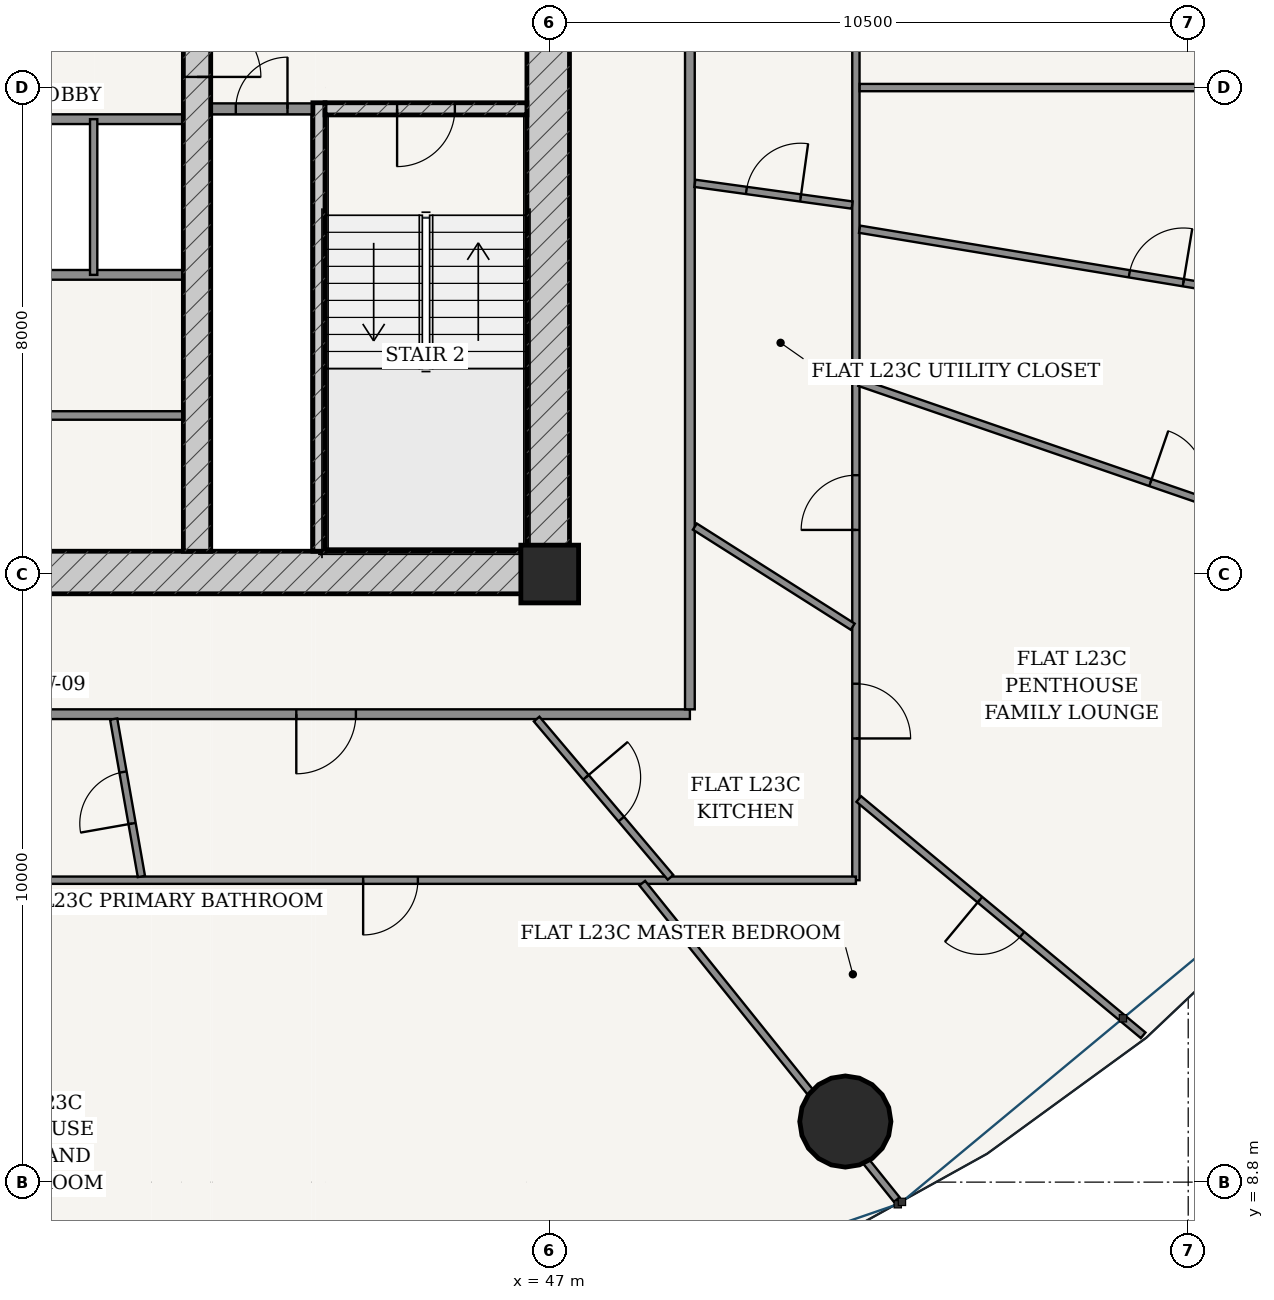
"""IFC4 building model, lengths in metres.
Left out: names, types, materials, properties, quantities, classifications, styles, units other than length and angle.
Written with IfcOpenShell. Run it as: python <this file> out.ifc"""

import sys

from ifc_helpers import new_model, si_unit, direction, frame, frame_2d, origin, origin_2d, place, context, subcontext, project, spatial, rectangle, hollow_circle, extrude, source, transform, mapped, element, fill, save


model = new_model("IFC4")
c1 = context("Model", 3, precision=1e-05, world=origin(), true_north=direction((-0.2419218956, 0.970295726276)))
c2 = subcontext(c1, "Body", "Model", "MODEL_VIEW")
j1 = project(units=[si_unit("LENGTHUNIT", "METRE"), si_unit("PLANEANGLEUNIT", "RADIAN")], contexts=[c1])
p1 = place(None, origin())
s1 = spatial("IfcSite", under=j1, at=p1, CompositionType="ELEMENT")
p2 = place(p1, origin())
s2 = spatial("IfcBuilding", under=s1, at=p2, CompositionType="ELEMENT")
p3 = place(p2, frame((0.0, 0.0, 90.6)))
s3 = spatial("IfcBuildingStorey", under=s2, at=p3, CompositionType="ELEMENT", Elevation=90.6)
p4 = place(p3, frame((47.0, 18.8, 0.0), z_axis=(0.0, 0.0, 1.0), x_axis=(1.0, 0.0, 0.0)))
e1 = element("IfcColumn", 1, at=p4, inside=s3, PredefinedType="COLUMN", context=c2, shape_type="SweptSolid", body=[
    extrude(rectangle(XDim=0.95, YDim=0.95, at=origin_2d()), origin(), (0.0, 0.0, 1.0), 3.6),
])
p5 = place(p3, frame((28.675, 18.825, 0.0), z_axis=(0.0, 0.0, 1.0), x_axis=(1.0, 0.0, 0.0)))
e2 = element("IfcWall", 2, at=p5, inside=s3, PredefinedType="SHEAR", context=c2, shape_type="SweptSolid", body=[
    extrude(rectangle(XDim=18.65, YDim=0.7, at=frame_2d((9.325, 0.0))), origin(), (0.0, 0.0, 1.0), 3.325),
])
p6 = place(p5, frame((8.9, 0.0, 0.0)))
e3 = element("IfcOpeningElement", 3, at=p6, cuts=e2, PredefinedType="OPENING", context=c2, shape_type="SweptSolid", body=[
    extrude(rectangle(XDim=0.85, YDim=2.1, at=frame_2d((0.425, 1.05))), frame((0.0, 0.36, 0.0), z_axis=(0.0, -1.0, 0.0), x_axis=(1.0, 0.0, 0.0)), (0.0, 0.0, 1.0), 0.72),
])
p7 = place(p3, frame((46.975, 19.175, 0.0), z_axis=(0.0, 0.0, 1.0), x_axis=(0.0, 1.0, 0.0)))
e4 = element("IfcWall", 4, at=p7, inside=s3, PredefinedType="SHEAR", context=c2, shape_type="SweptSolid", body=[
    extrude(rectangle(XDim=15.25, YDim=0.7, at=frame_2d((7.625, 0.0))), origin(), (0.0, 0.0, 1.0), 3.325),
])
p8 = place(p7, frame((9.875, 0.0, 0.0)))
e5 = element("IfcOpeningElement", 5, at=p8, cuts=e4, PredefinedType="OPENING", context=c2, shape_type="SweptSolid", body=[
    extrude(rectangle(XDim=1.5, YDim=2.2, at=frame_2d((0.75, 1.1))), frame((0.0, 0.36, 0.0), z_axis=(0.0, -1.0, 0.0), x_axis=(1.0, 0.0, 0.0)), (0.0, 0.0, 1.0), 0.72),
])
p9 = place(p3, frame((43.205, 19.175, 0.0), z_axis=(0.0, 0.0, 1.0), x_axis=(0.0, 1.0, 0.0)))
e6 = element("IfcWall", 6, at=p9, inside=s3, PredefinedType="SOLIDWALL", context=c2, shape_type="SweptSolid", body=[
    extrude(rectangle(XDim=7.375, YDim=0.2, at=frame_2d((3.688, 0.0))), origin(), (0.0, 0.0, 1.0), 3.325),
])
p10 = place(p3, frame((43.305, 26.45, 0.0), z_axis=(0.0, 0.0, 1.0), x_axis=(1.0, 0.0, 0.0)))
e7 = element("IfcWall", 7, at=p10, inside=s3, PredefinedType="SOLIDWALL", context=c2, shape_type="SweptSolid", body=[
    extrude(rectangle(XDim=3.32, YDim=0.2, at=frame_2d((1.66, 0.0))), origin(), (0.0, 0.0, 1.0), 3.325),
])
p11 = place(p10, frame((1.185, 0.0, 0.0)))
e8 = element("IfcOpeningElement", 8, at=p11, cuts=e7, PredefinedType="OPENING", context=c2, shape_type="SweptSolid", body=[
    extrude(rectangle(XDim=0.95, YDim=2.15, at=frame_2d((0.475, 1.075))), frame((0.0, 0.11, 0.0), z_axis=(0.0, -1.0, 0.0), x_axis=(1.0, 0.0, 0.0)), (0.0, 0.0, 1.0), 0.22),
])
p12 = place(p3, frame((41.2, 19.175, 0.0), z_axis=(0.0, 0.0, 1.0), x_axis=(0.0, 1.0, 0.0)))
e9 = element("IfcWall", 9, at=p12, inside=s3, PredefinedType="SHEAR", context=c2, shape_type="SweptSolid", body=[
    extrude(rectangle(XDim=15.25, YDim=0.45, at=frame_2d((7.625, 0.0))), origin(), (0.0, 0.0, 1.0), 3.325),
])
p13 = place(p12, frame((7.8, 0.0, 0.0)))
e10 = element("IfcOpeningElement", 10, at=p13, cuts=e9, PredefinedType="OPENING", context=c2, shape_type="SweptSolid", body=[
    extrude(rectangle(XDim=1.05, YDim=2.15, at=frame_2d((0.525, 1.075))), frame((0.0, 0.235, 0.0), z_axis=(0.0, -1.0, 0.0), x_axis=(1.0, 0.0, 0.0)), (0.0, 0.0, 1.0), 0.47),
])
p14 = place(p3, frame((51.862, 9.796, 0.0), z_axis=(0.0, 0.0, 1.0), x_axis=(1.0, 0.0, 0.0)))
e11 = element("IfcColumn", 11, at=p14, inside=s3, PredefinedType="COLUMN", context=c2, shape_type="SweptSolid", body=[
    extrude(hollow_circle(Radius=0.75, WallThickness=0.045, at=origin_2d()), origin(), (0.0, 0.0, 1.0), 3.6),
])
p15 = place(p3, frame((41.425, 26.45, 0.0), z_axis=(0.0, 0.0, 1.0), x_axis=(1.0, 0.0, 0.0)))
e12 = element("IfcWall", 12, at=p15, inside=s3, PredefinedType="PARTITIONING", context=c2, shape_type="SweptSolid", body=[
    extrude(rectangle(XDim=1.675, YDim=0.18, at=frame_2d((0.837, 0.0))), origin(), (0.0, 0.0, 1.0), 3.325),
])
p16 = place(p15, frame((0.413, 0.0, 0.0)))
e13 = element("IfcOpeningElement", 13, at=p16, cuts=e12, PredefinedType="OPENING", context=c2, shape_type="SweptSolid", body=[
    extrude(rectangle(XDim=0.85, YDim=2.1, at=frame_2d((0.425, 1.05))), frame((0.0, 0.1, 0.0), z_axis=(0.0, -1.0, 0.0), x_axis=(1.0, 0.0, 0.0)), (0.0, 0.0, 1.0), 0.2),
])
for number, where, z_axis, x_axis in (
    (14, (35.025, 26.28, 0.0), (0.0, 0.0, 1.0), (1.0, 0.0, 0.0)),
    (15, (35.025, 23.72, 0.0), (0.0, 0.0, 1.0), (1.0, 0.0, 0.0)),
):
    element("IfcWall", number, at=place(p3, frame(where, z_axis=z_axis, x_axis=x_axis)), inside=s3, PredefinedType="PARTITIONING", context=c2, shape_type="SweptSolid", body=[
        extrude(rectangle(XDim=5.95, YDim=0.16, at=frame_2d((2.975, 0.0))), origin(), (0.0, 0.0, 1.0), 3.325),
    ])
p17 = place(p3, frame((39.5, 23.72, 0.0), z_axis=(0.0, 0.0, 1.0), x_axis=(0.0, 1.0, 0.0)))
e16 = element("IfcWall", 16, at=p17, inside=s3, PredefinedType="PARTITIONING", context=c2, shape_type="SweptSolid", body=[
    extrude(rectangle(XDim=2.56, YDim=0.12, at=frame_2d((1.28, 0.0))), origin(), (0.0, 0.0, 1.0), 3.325),
])
p18 = place(p3, frame((35.025, 21.407, 0.0), z_axis=(0.0, 0.0, 1.0), x_axis=(1.0, 0.0, 0.0)))
e17 = element("IfcWall", 17, at=p18, inside=s3, PredefinedType="PARTITIONING", context=c2, shape_type="SweptSolid", body=[
    extrude(rectangle(XDim=5.95, YDim=0.14, at=frame_2d((2.975, 0.0))), origin(), (0.0, 0.0, 1.0), 3.325),
])
p19 = place(p18, frame((2.55, 0.0, 0.0)))
e18 = element("IfcOpeningElement", 18, at=p19, cuts=e17, PredefinedType="OPENING", context=c2, shape_type="SweptSolid", body=[
    extrude(rectangle(XDim=0.85, YDim=2.1, at=frame_2d((0.425, 1.05))), frame((0.0, 0.08, 0.0), z_axis=(0.0, -1.0, 0.0), x_axis=(1.0, 0.0, 0.0)), (0.0, 0.0, 1.0), 0.16),
])
p20 = place(p3, frame((26.695, 16.495, 0.0), z_axis=(0.0, 0.0, 1.0), x_axis=(1.0, 0.0, 0.0)))
e19 = element("IfcWall", 19, at=p20, inside=s3, PredefinedType="PARTITIONING", context=c2, shape_type="SweptSolid", body=[
    extrude(rectangle(XDim=22.61, YDim=0.16, at=frame_2d((11.305, 0.0))), origin(), (0.0, 0.0, 1.0), 2.767),
])
p21 = place(p20, frame((1.688, 0.0, 0.0)))
e20 = element("IfcOpeningElement", 20, at=p21, cuts=e19, PredefinedType="OPENING", context=c2, shape_type="SweptSolid", body=[
    extrude(rectangle(XDim=0.98, YDim=2.2, at=frame_2d((0.49, 1.1))), frame((0.0, 0.09, 0.0), z_axis=(0.0, -1.0, 0.0), x_axis=(1.0, 0.0, 0.0)), (0.0, 0.0, 1.0), 0.18),
])
p22 = place(p20, frame((16.137, 0.0, 0.0)))
e21 = element("IfcOpeningElement", 21, at=p22, cuts=e19, PredefinedType="OPENING", context=c2, shape_type="SweptSolid", body=[
    extrude(rectangle(XDim=0.98, YDim=2.2, at=frame_2d((0.49, 1.1))), frame((0.0, 0.09, 0.0), z_axis=(0.0, -1.0, 0.0), x_axis=(1.0, 0.0, 0.0)), (0.0, 0.0, 1.0), 0.18),
])
p23 = place(p3, frame((49.305, 16.575, 0.0), z_axis=(0.0, 0.0, 1.0), x_axis=(0.0, 1.0, 0.0)))
e22 = element("IfcWall", 22, at=p23, inside=s3, PredefinedType="PARTITIONING", context=c2, shape_type="SweptSolid", body=[
    extrude(rectangle(XDim=20.45, YDim=0.16, at=frame_2d((10.225, 0.0))), origin(), (0.0, 0.0, 1.0), 2.767),
])
p24 = place(p3, frame((52.035, 34.49, 0.0), z_axis=(0.0, 0.0, 1.0), x_axis=(0.0, -1.0, 0.0)))
e23 = element("IfcWall", 23, at=p24, inside=s3, PredefinedType="PARTITIONING", context=c2, shape_type="SweptSolid", body=[
    extrude(rectangle(XDim=20.725, YDim=0.12, at=frame_2d((10.362, 0.0))), origin(), (0.0, 0.0, 1.0), 2.767),
])
p25 = place(p24, frame((17.493, 0.0, 0.0)))
e24 = element("IfcOpeningElement", 24, at=p25, cuts=e23, PredefinedType="OPENING", context=c2, shape_type="SweptSolid", body=[
    extrude(rectangle(XDim=0.9, YDim=2.15, at=frame_2d((0.45, 1.075))), frame((0.0, 0.07, 0.0), z_axis=(0.0, -1.0, 0.0), x_axis=(1.0, 0.0, 0.0)), (0.0, 0.0, 1.0), 0.14),
])
p26 = place(p24, frame((14.064, 0.0, 0.0)))
e25 = element("IfcOpeningElement", 25, at=p26, cuts=e23, PredefinedType="OPENING", context=c2, shape_type="SweptSolid", body=[
    extrude(rectangle(XDim=0.9, YDim=2.15, at=frame_2d((0.45, 1.075))), frame((0.0, 0.07, 0.0), z_axis=(0.0, -1.0, 0.0), x_axis=(1.0, 0.0, 0.0)), (0.0, 0.0, 1.0), 0.14),
])
p27 = place(p3, frame((52.035, 13.765, 0.0), z_axis=(0.0, 0.0, 1.0), x_axis=(-1.0, 0.0, 0.0)))
e26 = element("IfcWall", 26, at=p27, inside=s3, PredefinedType="PARTITIONING", context=c2, shape_type="SweptSolid", body=[
    extrude(rectangle(XDim=17.054, YDim=0.12, at=frame_2d((8.527, 0.0))), origin(), (0.0, 0.0, 1.0), 2.767),
])
p28 = place(p27, frame((7.203, 0.0, 0.0)))
e27 = element("IfcOpeningElement", 27, at=p28, cuts=e26, PredefinedType="OPENING", context=c2, shape_type="SweptSolid", body=[
    extrude(rectangle(XDim=0.9, YDim=2.15, at=frame_2d((0.45, 1.075))), frame((0.0, 0.07, 0.0), z_axis=(0.0, -1.0, 0.0), x_axis=(1.0, 0.0, 0.0)), (0.0, 0.0, 1.0), 0.14),
])
p29 = place(p3, frame((48.522, 13.717, 0.0), z_axis=(0.0, 0.0, 1.0), x_axis=(0.626707979732, -0.77925419995, 0.0)))
e28 = element("IfcWall", 28, at=p29, inside=s3, PredefinedType="PARTITIONING", context=c2, shape_type="SweptSolid", body=[
    extrude(rectangle(XDim=6.679, YDim=0.12, at=frame_2d((3.339, 0.0))), origin(), (0.0, 0.0, 1.0), 2.767),
])
p30 = place(p3, frame((52.083, 15.1, 0.0), z_axis=(0.0, 0.0, 1.0), x_axis=(0.769161827891, -0.63905405289, 0.0)))
e29 = element("IfcWall", 29, at=p30, inside=s3, PredefinedType="PARTITIONING", context=c2, shape_type="SweptSolid", body=[
    extrude(rectangle(XDim=6.08, YDim=0.12, at=frame_2d((3.04, 0.0))), origin(), (0.0, 0.0, 1.0), 2.767),
])
p31 = place(p30, frame((2.59, 0.0, 0.0)))
e30 = element("IfcOpeningElement", 30, at=p31, cuts=e29, PredefinedType="OPENING", context=c2, shape_type="SweptSolid", body=[
    extrude(rectangle(XDim=0.9, YDim=2.15, at=frame_2d((0.45, 1.075))), frame((0.0, 0.07, 0.0), z_axis=(0.0, -1.0, 0.0), x_axis=(1.0, 0.0, 0.0)), (0.0, 0.0, 1.0), 0.14),
])
p32 = place(p3, frame((52.094, 21.95, 0.0), z_axis=(0.0, 0.0, 1.0), x_axis=(0.945573120726, -0.32540970078, 0.0)))
e31 = element("IfcWall", 31, at=p32, inside=s3, PredefinedType="PARTITIONING", context=c2, shape_type="SweptSolid", body=[
    extrude(rectangle(XDim=11.022, YDim=0.12, at=frame_2d((5.511, 0.0))), origin(), (0.0, 0.0, 1.0), 2.767),
])
p33 = place(p32, frame((5.061, 0.0, 0.0)))
e32 = element("IfcOpeningElement", 32, at=p33, cuts=e31, PredefinedType="OPENING", context=c2, shape_type="SweptSolid", body=[
    extrude(rectangle(XDim=0.9, YDim=2.15, at=frame_2d((0.45, 1.075))), frame((0.0, 0.07, 0.0), z_axis=(0.0, -1.0, 0.0), x_axis=(1.0, 0.0, 0.0)), (0.0, 0.0, 1.0), 0.14),
])
p34 = place(p3, frame((52.096, 24.47, 0.0), z_axis=(0.0, 0.0, 1.0), x_axis=(0.986618264768, -0.163047231274, 0.0)))
e33 = element("IfcWall", 33, at=p34, inside=s3, PredefinedType="PARTITIONING", context=c2, shape_type="SweptSolid", body=[
    extrude(rectangle(XDim=12.039, YDim=0.12, at=frame_2d((6.02, 0.0))), origin(), (0.0, 0.0, 1.0), 2.767),
])
p35 = place(p34, frame((4.496, 0.0, 0.0)))
e34 = element("IfcOpeningElement", 34, at=p35, cuts=e33, PredefinedType="OPENING", context=c2, shape_type="SweptSolid", body=[
    extrude(rectangle(XDim=0.9, YDim=2.15, at=frame_2d((0.45, 1.075))), frame((0.0, 0.07, 0.0), z_axis=(0.0, -1.0, 0.0), x_axis=(1.0, 0.0, 0.0)), (0.0, 0.0, 1.0), 0.14),
])
p36 = place(p3, frame((52.097, 26.8, 0.0), z_axis=(0.0, 0.0, 1.0), x_axis=(1.0, 0.0, 0.0)))
e35 = element("IfcWall", 35, at=p36, inside=s3, PredefinedType="PARTITIONING", context=c2, shape_type="SweptSolid", body=[
    extrude(rectangle(XDim=12.443, YDim=0.12, at=frame_2d((6.222, 0.0))), origin(), (0.0, 0.0, 1.0), 2.767),
])
p37 = place(p36, frame((5.771, 0.0, 0.0)))
e36 = element("IfcOpeningElement", 36, at=p37, cuts=e35, PredefinedType="OPENING", context=c2, shape_type="SweptSolid", body=[
    extrude(rectangle(XDim=0.9, YDim=2.15, at=frame_2d((0.45, 1.075))), frame((0.0, 0.07, 0.0), z_axis=(0.0, -1.0, 0.0), x_axis=(1.0, 0.0, 0.0)), (0.0, 0.0, 1.0), 0.14),
])
p38 = place(p3, frame((39.829, 16.415, 0.0), z_axis=(0.0, 0.0, 1.0), x_axis=(0.173488627881, -0.984835872618, 0.0)))
e37 = element("IfcWall", 37, at=p38, inside=s3, PredefinedType="PARTITIONING", context=c2, shape_type="SweptSolid", body=[
    extrude(rectangle(XDim=2.629, YDim=0.12, at=frame_2d((1.314, 0.0))), origin(), (0.0, 0.0, 1.0), 3.325),
])
p39 = place(p38, frame((0.885, 0.0, 0.0)))
e38 = element("IfcOpeningElement", 38, at=p39, cuts=e37, PredefinedType="OPENING", context=c2, shape_type="SweptSolid", body=[
    extrude(rectangle(XDim=0.86, YDim=2.15, at=frame_2d((0.43, 1.075))), frame((0.0, 0.07, 0.0), z_axis=(0.0, -1.0, 0.0), x_axis=(1.0, 0.0, 0.0)), (0.0, 0.0, 1.0), 0.14),
])
p40 = place(p3, frame((46.785, 16.415, 0.0), z_axis=(0.0, 0.0, 1.0), x_axis=(0.64582345164, -0.76348678398, 0.0)))
e39 = element("IfcWall", 39, at=p40, inside=s3, PredefinedType="PARTITIONING", context=c2, shape_type="SweptSolid", body=[
    extrude(rectangle(XDim=3.409, YDim=0.12, at=frame_2d((1.705, 0.0))), origin(), (0.0, 0.0, 1.0), 3.004),
])
p41 = place(p40, frame((1.254, 0.0, 0.0)))
e40 = element("IfcOpeningElement", 40, at=p41, cuts=e39, PredefinedType="OPENING", context=c2, shape_type="SweptSolid", body=[
    extrude(rectangle(XDim=0.9, YDim=2.15, at=frame_2d((0.45, 1.075))), frame((0.0, 0.07, 0.0), z_axis=(0.0, -1.0, 0.0), x_axis=(1.0, 0.0, 0.0)), (0.0, 0.0, 1.0), 0.14),
])
p42 = place(p3, frame((49.387, 19.58, 0.0), z_axis=(0.0, 0.0, 1.0), x_axis=(0.844540118368, -0.535492286094, 0.0)))
e41 = element("IfcWall", 41, at=p42, inside=s3, PredefinedType="PARTITIONING", context=c2, shape_type="SweptSolid", body=[
    extrude(rectangle(XDim=3.074, YDim=0.12, at=frame_2d((1.537, 0.0))), origin(), (0.0, 0.0, 1.0), 3.325),
])
p43 = place(p3, frame((49.387, 25.225, 0.0), z_axis=(0.0, 0.0, 1.0), x_axis=(0.990575253555, -0.136969584375, 0.0)))
e42 = element("IfcWall", 42, at=p43, inside=s3, PredefinedType="PARTITIONING", context=c2, shape_type="SweptSolid", body=[
    extrude(rectangle(XDim=2.611, YDim=0.12, at=frame_2d((1.306, 0.0))), origin(), (0.0, 0.0, 1.0), 3.325),
])
p44 = place(p43, frame((0.856, 0.0, 0.0)))
e43 = element("IfcOpeningElement", 43, at=p44, cuts=e42, PredefinedType="OPENING", context=c2, shape_type="SweptSolid", body=[
    extrude(rectangle(XDim=0.9, YDim=2.15, at=frame_2d((0.45, 1.075))), frame((0.0, 0.07, 0.0), z_axis=(0.0, -1.0, 0.0), x_axis=(1.0, 0.0, 0.0)), (0.0, 0.0, 1.0), 0.14),
])
m1 = source(origin(), c2, "Body", "SweptSolid", [
    extrude(rectangle(XDim=1.05, YDim=2.15, at=frame_2d((0.525, 1.075))), frame((0.0, 0.025, 0.0), z_axis=(0.0, -1.0, 0.0), x_axis=(1.0, 0.0, 0.0)), (0.0, 0.0, 1.0), 0.05),
])
p45 = place(p13, frame((1.05, 0.0, 0.0), z_axis=(0.0, 0.0, 1.0), x_axis=(-1.0, 0.0, 0.0)))
e44 = element("IfcDoor", 44, at=p45, inside=s3, OperationType="SINGLE_SWING_RIGHT", PredefinedType="DOOR", context=c2, shape_type="MappedRepresentation", body=[
    mapped(m1, transform((0.0, 0.0, 0.0), scale=1.0)),
])
fill(e10, e44)
m2 = source(origin(), c2, "Body", "SweptSolid", [
    extrude(rectangle(XDim=0.95, YDim=2.15, at=frame_2d((0.475, 1.075))), frame((0.0, 0.025, 0.0), z_axis=(0.0, -1.0, 0.0), x_axis=(1.0, 0.0, 0.0)), (0.0, 0.0, 1.0), 0.05),
])
p46 = place(p11, frame((0.95, 0.0, 0.0), z_axis=(0.0, 0.0, 1.0), x_axis=(-1.0, 0.0, 0.0)))
e45 = element("IfcDoor", 45, at=p46, inside=s3, OperationType="SINGLE_SWING_RIGHT", PredefinedType="DOOR", context=c2, shape_type="MappedRepresentation", body=[
    mapped(m2, transform((0.0, 0.0, 0.0), scale=1.0)),
])
fill(e8, e45)
m3 = source(origin(), c2, "Body", "SweptSolid", [
    extrude(rectangle(XDim=0.85, YDim=2.1, at=frame_2d((0.425, 1.05))), frame((0.0, 0.025, 0.0), z_axis=(0.0, -1.0, 0.0), x_axis=(1.0, 0.0, 0.0)), (0.0, 0.0, 1.0), 0.05),
])
p47 = place(p16, origin())
e46 = element("IfcDoor", 46, at=p47, inside=s3, OperationType="SINGLE_SWING_RIGHT", PredefinedType="DOOR", context=c2, shape_type="MappedRepresentation", body=[
    mapped(m3, transform((0.0, 0.0, 0.0), scale=1.0)),
])
fill(e13, e46)
m4 = source(origin(), c2, "Body", "SweptSolid", [
    extrude(rectangle(XDim=0.98, YDim=2.2, at=frame_2d((0.49, 1.1))), frame((0.0, 0.025, 0.0), z_axis=(0.0, -1.0, 0.0), x_axis=(1.0, 0.0, 0.0)), (0.0, 0.0, 1.0), 0.05),
])
p48 = place(p22, frame((0.98, 0.0, 0.0), z_axis=(0.0, 0.0, 1.0), x_axis=(-1.0, 0.0, 0.0)))
e47 = element("IfcDoor", 47, at=p48, inside=s3, OperationType="SINGLE_SWING_RIGHT", PredefinedType="DOOR", context=c2, shape_type="MappedRepresentation", body=[
    mapped(m4, transform((0.0, 0.0, 0.0), scale=1.0)),
])
fill(e21, e47)
m5 = source(origin(), c2, "Body", "SweptSolid", [
    extrude(rectangle(XDim=0.86, YDim=2.15, at=frame_2d((0.43, 1.075))), frame((0.0, 0.025, 0.0), z_axis=(0.0, -1.0, 0.0), x_axis=(1.0, 0.0, 0.0)), (0.0, 0.0, 1.0), 0.05),
])
p49 = place(p39, frame((0.86, 0.0, 0.0), z_axis=(0.0, 0.0, 1.0), x_axis=(-1.0, 0.0, 0.0)))
e48 = element("IfcDoor", 48, at=p49, inside=s3, OperationType="SINGLE_SWING_LEFT", PredefinedType="DOOR", context=c2, shape_type="MappedRepresentation", body=[
    mapped(m5, transform((0.0, 0.0, 0.0), scale=1.0)),
])
fill(e38, e48)
m6 = source(origin(), c2, "Body", "SweptSolid", [
    extrude(rectangle(XDim=0.9, YDim=2.15, at=frame_2d((0.45, 1.075))), frame((0.0, 0.025, 0.0), z_axis=(0.0, -1.0, 0.0), x_axis=(1.0, 0.0, 0.0)), (0.0, 0.0, 1.0), 0.05),
])
p50 = place(p28, origin())
e49 = element("IfcDoor", 49, at=p50, inside=s3, OperationType="SINGLE_SWING_RIGHT", PredefinedType="DOOR", context=c2, shape_type="MappedRepresentation", body=[
    mapped(m6, transform((0.0, 0.0, 0.0), scale=1.0)),
])
fill(e27, e49)
p51 = place(p41, origin())
e50 = element("IfcDoor", 50, at=p51, inside=s3, OperationType="SINGLE_SWING_LEFT", PredefinedType="DOOR", context=c2, shape_type="MappedRepresentation", body=[
    mapped(m6, transform((0.0, 0.0, 0.0), scale=1.0)),
])
fill(e40, e50)
p52 = place(p25, origin())
e51 = element("IfcDoor", 51, at=p52, inside=s3, OperationType="SINGLE_SWING_RIGHT", PredefinedType="DOOR", context=c2, shape_type="MappedRepresentation", body=[
    mapped(m6, transform((0.0, 0.0, 0.0), scale=1.0)),
])
fill(e24, e51)
p53 = place(p26, frame((0.9, 0.0, 0.0), z_axis=(0.0, 0.0, 1.0), x_axis=(-1.0, 0.0, 0.0)))
e52 = element("IfcDoor", 52, at=p53, inside=s3, OperationType="SINGLE_SWING_LEFT", PredefinedType="DOOR", context=c2, shape_type="MappedRepresentation", body=[
    mapped(m6, transform((0.0, 0.0, 0.0), scale=1.0)),
])
fill(e25, e52)
p54 = place(p44, origin())
e53 = element("IfcDoor", 53, at=p54, inside=s3, OperationType="SINGLE_SWING_RIGHT", PredefinedType="DOOR", context=c2, shape_type="MappedRepresentation", body=[
    mapped(m6, transform((0.0, 0.0, 0.0), scale=1.0)),
])
fill(e43, e53)
p55 = place(p31, frame((0.9, 0.0, 0.0), z_axis=(0.0, 0.0, 1.0), x_axis=(-1.0, 0.0, 0.0)))
e54 = element("IfcDoor", 54, at=p55, inside=s3, OperationType="SINGLE_SWING_RIGHT", PredefinedType="DOOR", context=c2, shape_type="MappedRepresentation", body=[
    mapped(m6, transform((0.0, 0.0, 0.0), scale=1.0)),
])
fill(e30, e54)
p56 = place(p33, origin())
e55 = element("IfcDoor", 55, at=p56, inside=s3, OperationType="SINGLE_SWING_LEFT", PredefinedType="DOOR", context=c2, shape_type="MappedRepresentation", body=[
    mapped(m6, transform((0.0, 0.0, 0.0), scale=1.0)),
])
fill(e32, e55)
p57 = place(p35, origin())
e56 = element("IfcDoor", 56, at=p57, inside=s3, OperationType="SINGLE_SWING_RIGHT", PredefinedType="DOOR", context=c2, shape_type="MappedRepresentation", body=[
    mapped(m6, transform((0.0, 0.0, 0.0), scale=1.0)),
])
fill(e34, e56)
save(model, sys.argv[1])
